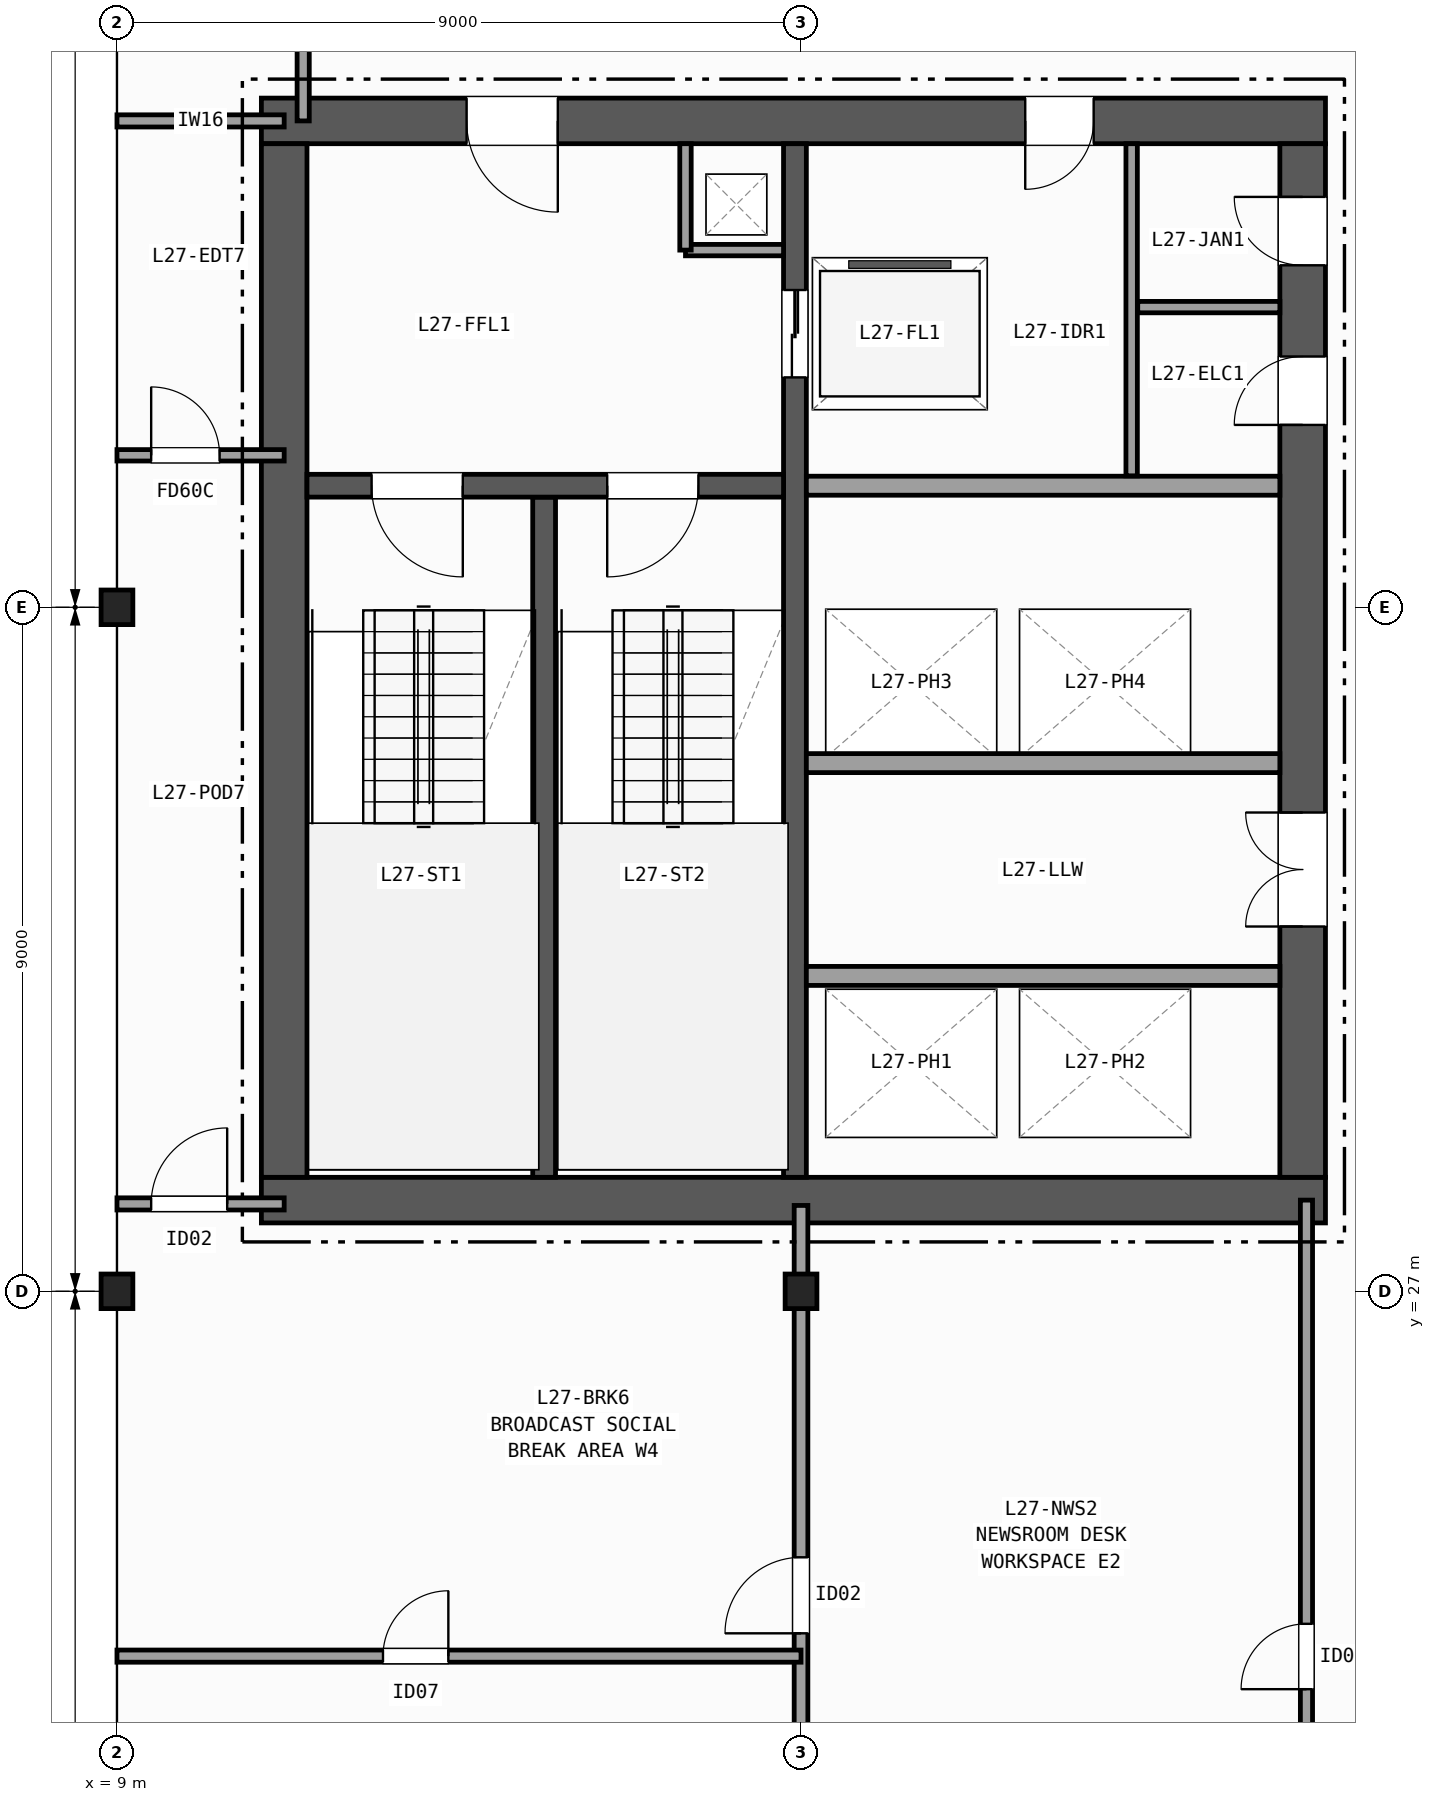
"""IFC4 building model, lengths in metres.
Left out: names, types, materials, properties, quantities, classifications, styles, units other than length and angle.
Written with IfcOpenShell. Run it as: python <this file> out.ifc"""

import sys

from ifc_helpers import new_model, si_unit, direction, frame, frame_2d, origin, origin_2d, place, context, subcontext, project, spatial, rectangle, i_section, extrude, element, fill, save


model = new_model("IFC4")
c1 = context("Model", 3, precision=1e-05, world=origin(), true_north=direction((0.0, 1.0)))
c2 = subcontext(c1, "Body", "Model", "MODEL_VIEW")
j1 = project(units=[si_unit("LENGTHUNIT", "METRE"), si_unit("PLANEANGLEUNIT", "RADIAN")], contexts=[c1])
p1 = place(None, origin())
s1 = spatial("IfcSite", under=j1, at=p1, CompositionType="ELEMENT")
p2 = place(p1, origin())
s2 = spatial("IfcBuilding", under=s1, at=p2, CompositionType="ELEMENT")
p3 = place(p2, frame((0.0, 0.0, 113.7)))
s3 = spatial("IfcBuildingStorey", under=s2, at=p3, CompositionType="ELEMENT", Elevation=113.7)
for number, where, z_axis, x_axis in (
    (1, (9.0, 27.0, 0.0), (0.0, 0.0, 1.0), (1.0, 0.0, 0.0)),
    (2, (9.0, 36.0, 0.0), (0.0, 0.0, 1.0), (1.0, 0.0, 0.0)),
    (3, (18.0, 27.0, 0.0), (0.0, 0.0, 1.0), (1.0, 0.0, 0.0)),
):
    element("IfcColumn", number, at=place(p3, frame(where, z_axis=z_axis, x_axis=x_axis)), inside=s3, PredefinedType="COLUMN", context=c2, shape_type="SweptSolid", body=[
        extrude(i_section(OverallWidth=0.418, OverallDepth=0.455, WebThickness=0.042, FlangeThickness=0.068, FilletRadius=0.015, at=origin_2d()), origin(), (0.0, 0.0, 1.0), 3.7),
    ])
p4 = place(p3, frame((10.9, 28.2, 0.0), z_axis=(0.0, 0.0, 1.0), x_axis=(1.0, 0.0, 0.0)))
e4 = element("IfcWall", 4, at=p4, inside=s3, PredefinedType="SHEAR", context=c2, shape_type="SweptSolid", body=[
    extrude(rectangle(XDim=14.0, YDim=0.6, at=frame_2d((7.0, 0.0))), origin(), (0.0, 0.0, 1.0), 3.42),
])
p5 = place(p3, frame((24.9, 42.4, 0.0), z_axis=(0.0, 0.0, 1.0), x_axis=(-1.0, 0.0, 0.0)))
e5 = element("IfcWall", 5, at=p5, inside=s3, PredefinedType="SHEAR", context=c2, shape_type="SweptSolid", body=[
    extrude(rectangle(XDim=14.0, YDim=0.6, at=frame_2d((7.0, 0.0))), origin(), (0.0, 0.0, 1.0), 3.42),
])
p6 = place(p5, frame((10.1, 0.0, 0.0)))
e6 = element("IfcOpeningElement", 6, at=p6, cuts=e5, PredefinedType="OPENING", context=c2, shape_type="SweptSolid", body=[
    extrude(rectangle(XDim=1.2, YDim=2.15, at=frame_2d((0.6, 1.075))), frame((0.0, 0.31, 0.0), z_axis=(0.0, -1.0, 0.0), x_axis=(1.0, 0.0, 0.0)), (0.0, 0.0, 1.0), 0.62),
])
p7 = place(p5, frame((3.05, 0.0, 0.0)))
e7 = element("IfcOpeningElement", 7, at=p7, cuts=e5, PredefinedType="OPENING", context=c2, shape_type="SweptSolid", body=[
    extrude(rectangle(XDim=0.9, YDim=2.1, at=frame_2d((0.45, 1.05))), frame((0.0, 0.31, 0.0), z_axis=(0.0, -1.0, 0.0), x_axis=(1.0, 0.0, 0.0)), (0.0, 0.0, 1.0), 0.62),
])
p8 = place(p3, frame((11.2, 42.1, 0.0), z_axis=(0.0, 0.0, 1.0), x_axis=(0.0, -1.0, 0.0)))
e8 = element("IfcWall", 8, at=p8, inside=s3, PredefinedType="SHEAR", context=c2, shape_type="SweptSolid", body=[
    extrude(rectangle(XDim=13.6, YDim=0.6, at=frame_2d((6.8, 0.0))), origin(), (0.0, 0.0, 1.0), 3.42),
])
p9 = place(p3, frame((24.6, 28.5, 0.0), z_axis=(0.0, 0.0, 1.0), x_axis=(0.0, 1.0, 0.0)))
e9 = element("IfcWall", 9, at=p9, inside=s3, PredefinedType="SHEAR", context=c2, shape_type="SweptSolid", body=[
    extrude(rectangle(XDim=13.6, YDim=0.6, at=frame_2d((6.8, 0.0))), origin(), (0.0, 0.0, 1.0), 3.42),
])
p10 = place(p9, frame((3.3, 0.0, 0.0)))
e10 = element("IfcOpeningElement", 10, at=p10, cuts=e9, PredefinedType="OPENING", context=c2, shape_type="SweptSolid", body=[
    extrude(rectangle(XDim=1.5, YDim=2.2, at=frame_2d((0.75, 1.1))), frame((0.0, 0.31, 0.0), z_axis=(0.0, -1.0, 0.0), x_axis=(1.0, 0.0, 0.0)), (0.0, 0.0, 1.0), 0.62),
])
p11 = place(p9, frame((9.9, 0.0, 0.0)))
e11 = element("IfcOpeningElement", 11, at=p11, cuts=e9, PredefinedType="OPENING", context=c2, shape_type="SweptSolid", body=[
    extrude(rectangle(XDim=0.9, YDim=2.1, at=frame_2d((0.45, 1.05))), frame((0.0, 0.31, 0.0), z_axis=(0.0, -1.0, 0.0), x_axis=(1.0, 0.0, 0.0)), (0.0, 0.0, 1.0), 0.62),
])
p12 = place(p9, frame((12.0, 0.0, 0.0)))
e12 = element("IfcOpeningElement", 12, at=p12, cuts=e9, PredefinedType="OPENING", context=c2, shape_type="SweptSolid", body=[
    extrude(rectangle(XDim=0.9, YDim=2.1, at=frame_2d((0.45, 1.05))), frame((0.0, 0.31, 0.0), z_axis=(0.0, -1.0, 0.0), x_axis=(1.0, 0.0, 0.0)), (0.0, 0.0, 1.0), 0.62),
])
p13 = place(p3, frame((14.62, 28.5, 0.0), z_axis=(0.0, 0.0, 1.0), x_axis=(0.0, 1.0, 0.0)))
e13 = element("IfcWall", 13, at=p13, inside=s3, PredefinedType="SHEAR", context=c2, shape_type="SweptSolid", body=[
    extrude(rectangle(XDim=8.95, YDim=0.3, at=frame_2d((4.475, 0.0))), origin(), (0.0, 0.0, 1.0), 3.42),
])
p14 = place(p3, frame((17.92, 42.1, 0.0), z_axis=(0.0, 0.0, 1.0), x_axis=(0.0, -1.0, 0.0)))
e14 = element("IfcWall", 14, at=p14, inside=s3, PredefinedType="SHEAR", context=c2, shape_type="SweptSolid", body=[
    extrude(rectangle(XDim=13.6, YDim=0.3, at=frame_2d((6.8, 0.0))), origin(), (0.0, 0.0, 1.0), 3.42),
])
p15 = place(p14, frame((1.925, 0.0, 0.0)))
e15 = element("IfcOpeningElement", 15, at=p15, cuts=e14, PredefinedType="OPENING", context=c2, shape_type="SweptSolid", body=[
    extrude(rectangle(XDim=1.15, YDim=2.15, at=frame_2d((0.575, 1.075))), frame((0.0, 0.16, 0.0), z_axis=(0.0, -1.0, 0.0), x_axis=(1.0, 0.0, 0.0)), (0.0, 0.0, 1.0), 0.32),
])
p16 = place(p3, frame((17.77, 37.6, 0.0), z_axis=(0.0, 0.0, 1.0), x_axis=(-1.0, 0.0, 0.0)))
e16 = element("IfcWall", 16, at=p16, inside=s3, PredefinedType="SHEAR", context=c2, shape_type="SweptSolid", body=[
    extrude(rectangle(XDim=6.27, YDim=0.3, at=frame_2d((3.135, 0.0))), origin(), (0.0, 0.0, 1.0), 3.42),
])
p17 = place(p16, frame((4.22, 0.0, 0.0)))
e17 = element("IfcOpeningElement", 17, at=p17, cuts=e16, PredefinedType="OPENING", context=c2, shape_type="SweptSolid", body=[
    extrude(rectangle(XDim=1.2, YDim=2.15, at=frame_2d((0.6, 1.075))), frame((0.0, 0.16, 0.0), z_axis=(0.0, -1.0, 0.0), x_axis=(1.0, 0.0, 0.0)), (0.0, 0.0, 1.0), 0.32),
])
p18 = place(p16, frame((1.12, 0.0, 0.0)))
e18 = element("IfcOpeningElement", 18, at=p18, cuts=e16, PredefinedType="OPENING", context=c2, shape_type="SweptSolid", body=[
    extrude(rectangle(XDim=1.2, YDim=2.15, at=frame_2d((0.6, 1.075))), frame((0.0, 0.16, 0.0), z_axis=(0.0, -1.0, 0.0), x_axis=(1.0, 0.0, 0.0)), (0.0, 0.0, 1.0), 0.32),
])
p19 = place(p3, frame((16.48, 40.7, 0.0), z_axis=(0.0, 0.0, 1.0), x_axis=(1.0, 0.0, 0.0)))
e19 = element("IfcWall", 19, at=p19, inside=s3, PredefinedType="PARTITIONING", context=c2, shape_type="SweptSolid", body=[
    extrude(rectangle(XDim=1.29, YDim=0.15, at=frame_2d((0.645, 0.0))), origin(), (0.0, 0.0, 1.0), 3.42),
])
p20 = place(p3, frame((16.48, 40.7, 0.0), z_axis=(0.0, 0.0, 1.0), x_axis=(0.0, 1.0, 0.0)))
e20 = element("IfcWall", 20, at=p20, inside=s3, PredefinedType="PARTITIONING", context=c2, shape_type="SweptSolid", body=[
    extrude(rectangle(XDim=1.4, YDim=0.15, at=frame_2d((0.7, 0.0))), origin(), (0.0, 0.0, 1.0), 3.42),
])
for number, where, z_axis, x_axis in (
    (21, (18.07, 37.6, 0.0), (0.0, 0.0, 1.0), (1.0, 0.0, 0.0)),
    (22, (18.07, 31.15, 0.0), (0.0, 0.0, 1.0), (1.0, 0.0, 0.0)),
    (23, (24.3, 33.95, 0.0), (0.0, 0.0, 1.0), (-1.0, 0.0, 0.0)),
):
    element("IfcWall", number, at=place(p3, frame(where, z_axis=z_axis, x_axis=x_axis)), inside=s3, PredefinedType="PARTITIONING", context=c2, shape_type="SweptSolid", body=[
        extrude(rectangle(XDim=6.23, YDim=0.25, at=frame_2d((3.115, 0.0))), origin(), (0.0, 0.0, 1.0), 3.42),
    ])
p21 = place(p3, frame((22.35, 37.73, 0.0), z_axis=(0.0, 0.0, 1.0), x_axis=(0.0, 1.0, 0.0)))
e24 = element("IfcWall", 24, at=p21, inside=s3, PredefinedType="PARTITIONING", context=c2, shape_type="SweptSolid", body=[
    extrude(rectangle(XDim=4.37, YDim=0.15, at=frame_2d((2.185, 0.0))), origin(), (0.0, 0.0, 1.0), 3.42),
])
p22 = place(p3, frame((22.43, 39.95, 0.0), z_axis=(0.0, 0.0, 1.0), x_axis=(1.0, 0.0, 0.0)))
e25 = element("IfcWall", 25, at=p22, inside=s3, PredefinedType="PARTITIONING", context=c2, shape_type="SweptSolid", body=[
    extrude(rectangle(XDim=1.87, YDim=0.15, at=frame_2d((0.935, 0.0))), origin(), (0.0, 0.0, 1.0), 3.42),
])
p23 = place(p3, frame((9.0, 28.15, 0.0), z_axis=(0.0, 0.0, 1.0), x_axis=(1.0, 0.0, 0.0)))
e26 = element("IfcWall", 26, at=p23, inside=s3, PredefinedType="PARTITIONING", context=c2, shape_type="SweptSolid", body=[
    extrude(rectangle(XDim=2.2, YDim=0.16, at=frame_2d((1.1, 0.0))), origin(), (0.0, 0.0, 1.0), 2.634),
])
p24 = place(p23, frame((0.45, 0.0, 0.0)))
e27 = element("IfcOpeningElement", 27, at=p24, cuts=e26, PredefinedType="OPENING", context=c2, shape_type="SweptSolid", body=[
    extrude(rectangle(XDim=1.0, YDim=2.1, at=frame_2d((0.5, 1.05))), frame((0.0, 0.09, 0.0), z_axis=(0.0, -1.0, 0.0), x_axis=(1.0, 0.0, 0.0)), (0.0, 0.0, 1.0), 0.18),
])
p25 = place(p3, frame((9.0, 42.4, 0.0), z_axis=(0.0, 0.0, 1.0), x_axis=(1.0, 0.0, 0.0)))
e28 = element("IfcWall", 28, at=p25, inside=s3, PredefinedType="PARTITIONING", context=c2, shape_type="SweptSolid", body=[
    extrude(rectangle(XDim=2.2, YDim=0.16, at=frame_2d((1.1, 0.0))), origin(), (0.0, 0.0, 1.0), 2.634),
])
p26 = place(p3, frame((11.45, 42.4, 0.0), z_axis=(0.0, 0.0, 1.0), x_axis=(0.0, 1.0, 0.0)))
e29 = element("IfcWall", 29, at=p26, inside=s3, PredefinedType="PARTITIONING", context=c2, shape_type="SweptSolid", body=[
    extrude(rectangle(XDim=2.1, YDim=0.16, at=frame_2d((1.05, 0.0))), origin(), (0.0, 0.0, 1.0), 3.42),
])
p27 = place(p3, frame((9.0, 38.0, 0.0), z_axis=(0.0, 0.0, 1.0), x_axis=(1.0, 0.0, 0.0)))
e30 = element("IfcWall", 30, at=p27, inside=s3, PredefinedType="PARTITIONING", context=c2, shape_type="SweptSolid", body=[
    extrude(rectangle(XDim=2.2, YDim=0.15, at=frame_2d((1.1, 0.0))), origin(), (0.0, 0.0, 1.0), 2.634),
])
p28 = place(p27, frame((0.45, 0.0, 0.0)))
e31 = element("IfcOpeningElement", 31, at=p28, cuts=e30, PredefinedType="OPENING", context=c2, shape_type="SweptSolid", body=[
    extrude(rectangle(XDim=0.9, YDim=2.1, at=frame_2d((0.45, 1.05))), frame((0.0, 0.085, 0.0), z_axis=(0.0, -1.0, 0.0), x_axis=(1.0, 0.0, 0.0)), (0.0, 0.0, 1.0), 0.17),
])
p29 = place(p3, frame((24.65, 9.0, 0.0), z_axis=(0.0, 0.0, 1.0), x_axis=(0.0, 1.0, 0.0)))
e32 = element("IfcWall", 32, at=p29, inside=s3, PredefinedType="PARTITIONING", context=c2, shape_type="SweptSolid", body=[
    extrude(rectangle(XDim=19.2, YDim=0.16, at=frame_2d((9.6, 0.0))), origin(), (0.0, 0.0, 1.0), 2.634),
])
p30 = place(p29, frame((3.2, 0.0, 0.0)))
e33 = element("IfcOpeningElement", 33, at=p30, cuts=e32, PredefinedType="OPENING", context=c2, shape_type="SweptSolid", body=[
    extrude(rectangle(XDim=1.2, YDim=2.15, at=frame_2d((0.6, 1.075))), frame((0.0, 0.09, 0.0), z_axis=(0.0, -1.0, 0.0), x_axis=(1.0, 0.0, 0.0)), (0.0, 0.0, 1.0), 0.18),
])
p31 = place(p29, frame((12.765, 0.0, 0.0)))
e34 = element("IfcOpeningElement", 34, at=p31, cuts=e32, PredefinedType="OPENING", context=c2, shape_type="SweptSolid", body=[
    extrude(rectangle(XDim=0.86, YDim=2.05, at=frame_2d((0.43, 1.025))), frame((0.0, 0.09, 0.0), z_axis=(0.0, -1.0, 0.0), x_axis=(1.0, 0.0, 0.0)), (0.0, 0.0, 1.0), 0.18),
])
p32 = place(p3, frame((18.0, 9.0, 0.0), z_axis=(0.0, 0.0, 1.0), x_axis=(0.0, 1.0, 0.0)))
e35 = element("IfcWall", 35, at=p32, inside=s3, PredefinedType="PARTITIONING", context=c2, shape_type="SweptSolid", body=[
    extrude(rectangle(XDim=19.13, YDim=0.18, at=frame_2d((9.565, 0.0))), origin(), (0.0, 0.0, 1.0), 2.634),
])
p33 = place(p32, frame((2.2, 0.0, 0.0)))
e36 = element("IfcOpeningElement", 36, at=p33, cuts=e35, PredefinedType="OPENING", context=c2, shape_type="SweptSolid", body=[
    extrude(rectangle(XDim=0.95, YDim=2.1, at=frame_2d((0.475, 1.05))), frame((0.0, 0.1, 0.0), z_axis=(0.0, -1.0, 0.0), x_axis=(1.0, 0.0, 0.0)), (0.0, 0.0, 1.0), 0.2),
])
p34 = place(p32, frame((13.5, 0.0, 0.0)))
e37 = element("IfcOpeningElement", 37, at=p34, cuts=e35, PredefinedType="OPENING", context=c2, shape_type="SweptSolid", body=[
    extrude(rectangle(XDim=1.0, YDim=2.1, at=frame_2d((0.5, 1.05))), frame((0.0, 0.1, 0.0), z_axis=(0.0, -1.0, 0.0), x_axis=(1.0, 0.0, 0.0)), (0.0, 0.0, 1.0), 0.2),
])
p35 = place(p3, frame((9.0, 22.2, 0.0), z_axis=(0.0, 0.0, 1.0), x_axis=(1.0, 0.0, 0.0)))
e38 = element("IfcWall", 38, at=p35, inside=s3, PredefinedType="PARTITIONING", context=c2, shape_type="SweptSolid", body=[
    extrude(rectangle(XDim=9.0, YDim=0.16, at=frame_2d((4.5, 0.0))), origin(), (0.0, 0.0, 1.0), 2.634),
])
p36 = place(p35, frame((3.5, 0.0, 0.0)))
e39 = element("IfcOpeningElement", 39, at=p36, cuts=e38, PredefinedType="OPENING", context=c2, shape_type="SweptSolid", body=[
    extrude(rectangle(XDim=0.86, YDim=2.05, at=frame_2d((0.43, 1.025))), frame((0.0, 0.09, 0.0), z_axis=(0.0, -1.0, 0.0), x_axis=(1.0, 0.0, 0.0)), (0.0, 0.0, 1.0), 0.18),
])
p37 = place(p17, origin())
e40 = element("IfcDoor", 40, at=p37, inside=s3, OperationType="SINGLE_SWING_LEFT", PredefinedType="DOOR", context=c2, shape_type="SweptSolid", body=[
    extrude(rectangle(XDim=1.2, YDim=2.15, at=frame_2d((0.6, 1.075))), frame((0.0, 0.025, 0.0), z_axis=(0.0, -1.0, 0.0), x_axis=(1.0, 0.0, 0.0)), (0.0, 0.0, 1.0), 0.05),
])
fill(e17, e40)
p38 = place(p18, origin())
e41 = element("IfcDoor", 41, at=p38, inside=s3, OperationType="SINGLE_SWING_RIGHT", PredefinedType="DOOR", context=c2, shape_type="SweptSolid", body=[
    extrude(rectangle(XDim=1.2, YDim=2.15, at=frame_2d((0.6, 1.075))), frame((0.0, 0.025, 0.0), z_axis=(0.0, -1.0, 0.0), x_axis=(1.0, 0.0, 0.0)), (0.0, 0.0, 1.0), 0.05),
])
fill(e18, e41)
p39 = place(p10, origin())
e42 = element("IfcDoor", 42, at=p39, inside=s3, OperationType="DOUBLE_DOOR_SINGLE_SWING", PredefinedType="DOOR", context=c2, shape_type="SweptSolid", body=[
    extrude(rectangle(XDim=1.5, YDim=2.2, at=frame_2d((0.75, 1.1))), frame((0.0, 0.025, 0.0), z_axis=(0.0, -1.0, 0.0), x_axis=(1.0, 0.0, 0.0)), (0.0, 0.0, 1.0), 0.05),
])
fill(e10, e42)
p40 = place(p6, origin())
e43 = element("IfcDoor", 43, at=p40, inside=s3, OperationType="SINGLE_SWING_LEFT", PredefinedType="DOOR", context=c2, shape_type="SweptSolid", body=[
    extrude(rectangle(XDim=1.2, YDim=2.15, at=frame_2d((0.6, 1.075))), frame((0.0, 0.025, 0.0), z_axis=(0.0, -1.0, 0.0), x_axis=(1.0, 0.0, 0.0)), (0.0, 0.0, 1.0), 0.05),
])
fill(e6, e43)
p41 = place(p11, origin())
e44 = element("IfcDoor", 44, at=p41, inside=s3, OperationType="SINGLE_SWING_LEFT", PredefinedType="DOOR", context=c2, shape_type="SweptSolid", body=[
    extrude(rectangle(XDim=0.9, YDim=2.1, at=frame_2d((0.45, 1.05))), frame((0.0, 0.025, 0.0), z_axis=(0.0, -1.0, 0.0), x_axis=(1.0, 0.0, 0.0)), (0.0, 0.0, 1.0), 0.05),
])
fill(e11, e44)
p42 = place(p7, origin())
e45 = element("IfcDoor", 45, at=p42, inside=s3, OperationType="SINGLE_SWING_RIGHT", PredefinedType="DOOR", context=c2, shape_type="SweptSolid", body=[
    extrude(rectangle(XDim=0.9, YDim=2.1, at=frame_2d((0.45, 1.05))), frame((0.0, 0.025, 0.0), z_axis=(0.0, -1.0, 0.0), x_axis=(1.0, 0.0, 0.0)), (0.0, 0.0, 1.0), 0.05),
])
fill(e7, e45)
p43 = place(p12, origin())
e46 = element("IfcDoor", 46, at=p43, inside=s3, OperationType="SINGLE_SWING_RIGHT", PredefinedType="DOOR", context=c2, shape_type="SweptSolid", body=[
    extrude(rectangle(XDim=0.9, YDim=2.1, at=frame_2d((0.45, 1.05))), frame((0.0, 0.025, 0.0), z_axis=(0.0, -1.0, 0.0), x_axis=(1.0, 0.0, 0.0)), (0.0, 0.0, 1.0), 0.05),
])
fill(e12, e46)
p44 = place(p15, origin())
e47 = element("IfcDoor", 47, at=p44, inside=s3, OperationType="DOUBLE_DOOR_SLIDING", PredefinedType="DOOR", context=c2, shape_type="SweptSolid", body=[
    extrude(rectangle(XDim=1.15, YDim=2.15, at=frame_2d((0.575, 1.075))), frame((0.0, 0.025, 0.0), z_axis=(0.0, -1.0, 0.0), x_axis=(1.0, 0.0, 0.0)), (0.0, 0.0, 1.0), 0.05),
])
fill(e15, e47)
p45 = place(p24, origin())
e48 = element("IfcDoor", 48, at=p45, inside=s3, OperationType="SINGLE_SWING_RIGHT", PredefinedType="DOOR", context=c2, shape_type="SweptSolid", body=[
    extrude(rectangle(XDim=1.0, YDim=2.1, at=frame_2d((0.5, 1.05))), frame((0.0, 0.025, 0.0), z_axis=(0.0, -1.0, 0.0), x_axis=(1.0, 0.0, 0.0)), (0.0, 0.0, 1.0), 0.05),
])
fill(e27, e48)
p46 = place(p28, origin())
e49 = element("IfcDoor", 49, at=p46, inside=s3, OperationType="SINGLE_SWING_LEFT", PredefinedType="DOOR", context=c2, shape_type="SweptSolid", body=[
    extrude(rectangle(XDim=0.9, YDim=2.1, at=frame_2d((0.45, 1.05))), frame((0.0, 0.025, 0.0), z_axis=(0.0, -1.0, 0.0), x_axis=(1.0, 0.0, 0.0)), (0.0, 0.0, 1.0), 0.05),
])
fill(e31, e49)
p47 = place(p31, origin())
e50 = element("IfcDoor", 50, at=p47, inside=s3, OperationType="SINGLE_SWING_LEFT", PredefinedType="DOOR", context=c2, shape_type="SweptSolid", body=[
    extrude(rectangle(XDim=0.86, YDim=2.05, at=frame_2d((0.43, 1.025))), frame((0.0, 0.025, 0.0), z_axis=(0.0, -1.0, 0.0), x_axis=(1.0, 0.0, 0.0)), (0.0, 0.0, 1.0), 0.05),
])
fill(e34, e50)
p48 = place(p34, origin())
e51 = element("IfcDoor", 51, at=p48, inside=s3, OperationType="SINGLE_SWING_LEFT", PredefinedType="DOOR", context=c2, shape_type="SweptSolid", body=[
    extrude(rectangle(XDim=1.0, YDim=2.1, at=frame_2d((0.5, 1.05))), frame((0.0, 0.025, 0.0), z_axis=(0.0, -1.0, 0.0), x_axis=(1.0, 0.0, 0.0)), (0.0, 0.0, 1.0), 0.05),
])
fill(e37, e51)
p49 = place(p36, origin())
e52 = element("IfcDoor", 52, at=p49, inside=s3, OperationType="SINGLE_SWING_RIGHT", PredefinedType="DOOR", context=c2, shape_type="SweptSolid", body=[
    extrude(rectangle(XDim=0.86, YDim=2.05, at=frame_2d((0.43, 1.025))), frame((0.0, 0.025, 0.0), z_axis=(0.0, -1.0, 0.0), x_axis=(1.0, 0.0, 0.0)), (0.0, 0.0, 1.0), 0.05),
])
fill(e39, e52)
save(model, sys.argv[1])
